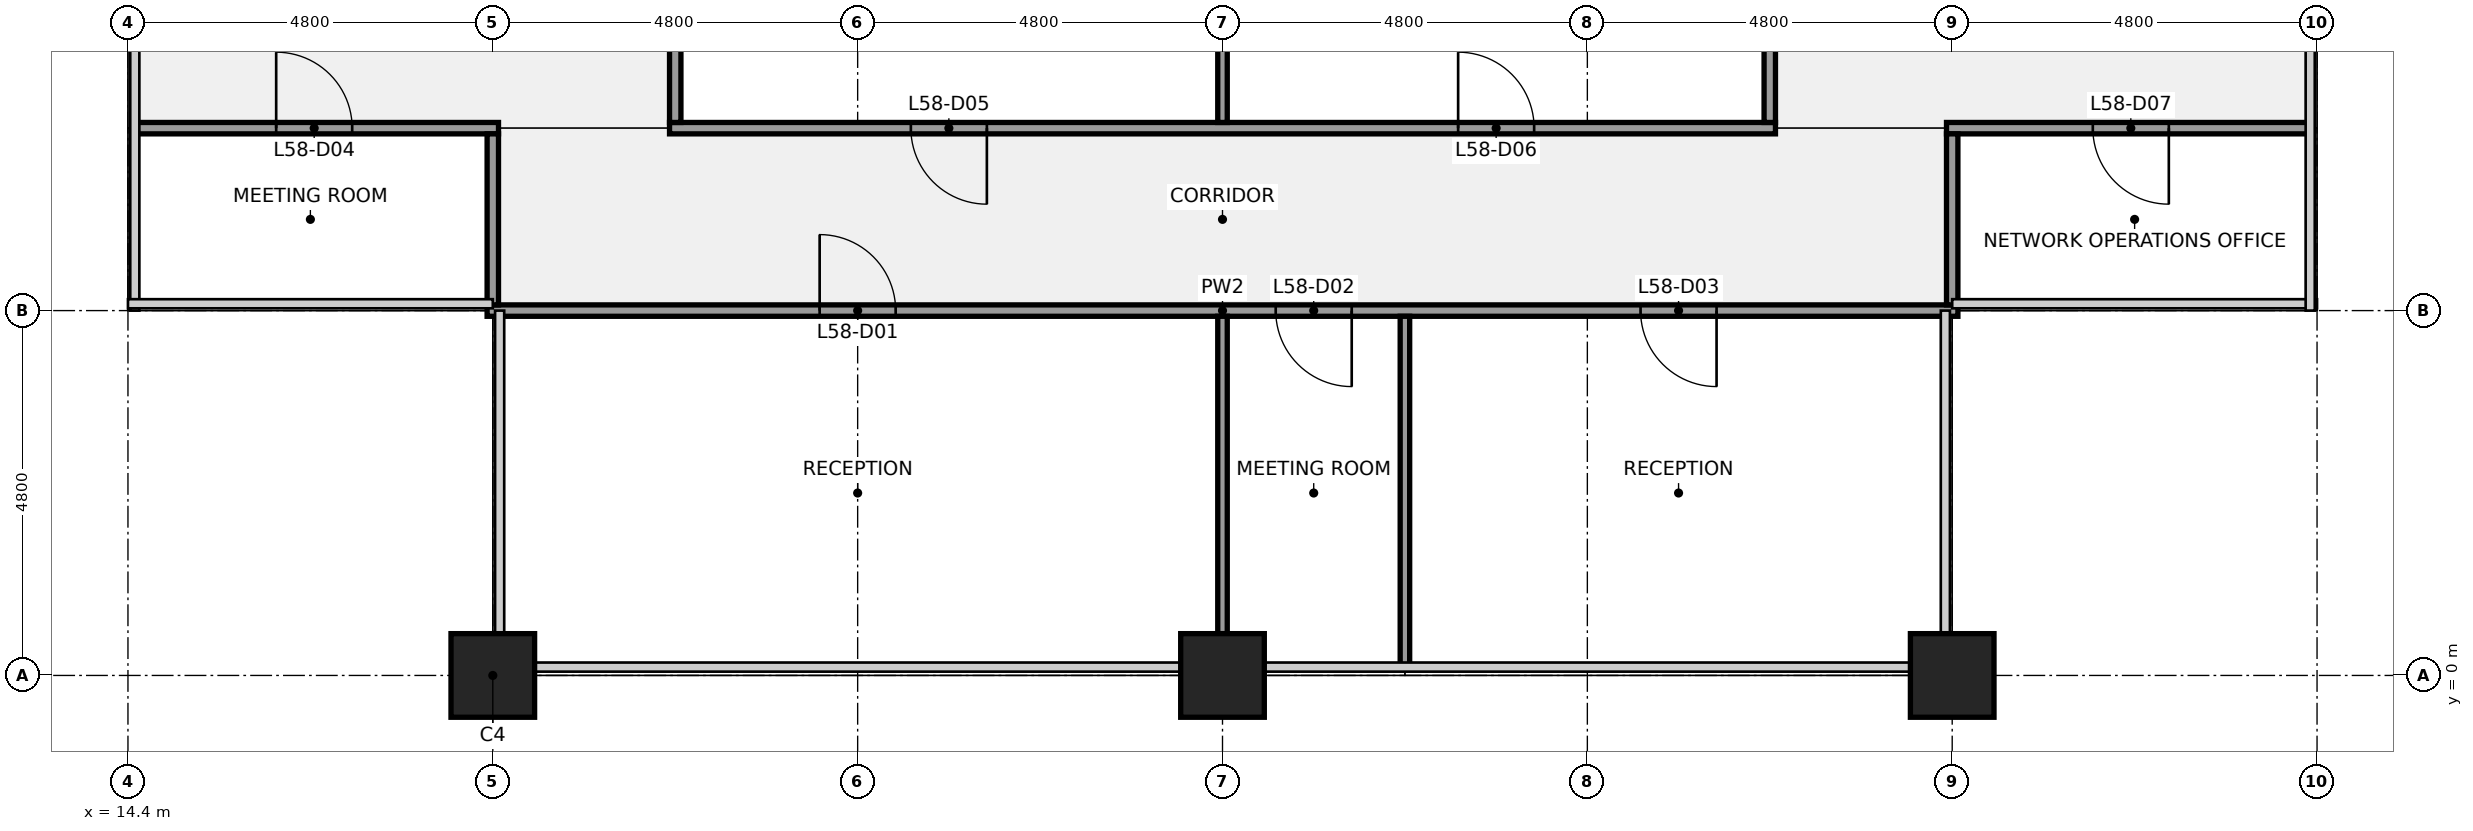
"""IFC4 building model, lengths in metres.
Left out: names, types, materials, properties, quantities, classifications, styles, units other than length and angle.
Written with IfcOpenShell. Run it as: python <this file> out.ifc"""

import sys

from ifc_helpers import new_model, si_unit, direction, frame, frame_2d, origin, origin_2d, place, context, subcontext, project, spatial, rectangle, extrude, element, fill, save


model = new_model("IFC4")
c1 = context("Model", 3, precision=1e-05, world=origin(), true_north=direction((0.0, 1.0)))
c2 = subcontext(c1, "Body", "Model", "MODEL_VIEW")
j1 = project(units=[si_unit("LENGTHUNIT", "METRE"), si_unit("PLANEANGLEUNIT", "RADIAN")], contexts=[c1])
p1 = place(None, origin())
s1 = spatial("IfcSite", under=j1, at=p1, CompositionType="ELEMENT")
p2 = place(p1, origin())
s2 = spatial("IfcBuilding", under=s1, at=p2, CompositionType="ELEMENT")
p3 = place(p2, frame((0.0, 0.0, 261.2)))
s3 = spatial("IfcBuildingStorey", under=s2, at=p3, CompositionType="ELEMENT", Elevation=261.2)
for number, where, z_axis, x_axis in (
    (1, (19.2, 0.0, 0.0), (0.0, 0.0, 1.0), (1.0, 0.0, 0.0)),
    (2, (28.8, 0.0, 0.0), (0.0, 0.0, 1.0), (1.0, 0.0, 0.0)),
    (3, (38.4, 0.0, 0.0), (0.0, 0.0, 1.0), (1.0, 0.0, 0.0)),
):
    element("IfcColumn", number, at=place(p3, frame(where, z_axis=z_axis, x_axis=x_axis)), inside=s3, PredefinedType="COLUMN", context=c2, shape_type="SweptSolid", body=[
        extrude(rectangle(XDim=1.1, YDim=1.1, at=origin_2d()), origin(), (0.0, 0.0, 1.0), 4.0),
    ])
p4 = place(p3, frame((19.125, 4.8, 0.0), z_axis=(0.0, 0.0, 1.0), x_axis=(1.0, 0.0, 0.0)))
e4 = element("IfcWall", 4, at=p4, inside=s3, PredefinedType="PARTITIONING", context=c2, shape_type="SweptSolid", body=[
    extrude(rectangle(XDim=19.35, YDim=0.15, at=frame_2d((9.675, 0.0))), origin(), (0.0, 0.0, 1.0), 2.709),
])
p5 = place(p4, frame((4.375, 0.0, 0.0)))
e5 = element("IfcOpeningElement", 5, at=p5, cuts=e4, PredefinedType="OPENING", context=c2, shape_type="SweptSolid", body=[
    extrude(rectangle(XDim=1.0, YDim=2.1, at=frame_2d((0.5, 1.05))), frame((0.0, 0.085, 0.0), z_axis=(0.0, -1.0, 0.0), x_axis=(1.0, 0.0, 0.0)), (0.0, 0.0, 1.0), 0.17),
])
p6 = place(p4, frame((10.375, 0.0, 0.0)))
e6 = element("IfcOpeningElement", 6, at=p6, cuts=e4, PredefinedType="OPENING", context=c2, shape_type="SweptSolid", body=[
    extrude(rectangle(XDim=1.0, YDim=2.1, at=frame_2d((0.5, 1.05))), frame((0.0, 0.085, 0.0), z_axis=(0.0, -1.0, 0.0), x_axis=(1.0, 0.0, 0.0)), (0.0, 0.0, 1.0), 0.17),
])
p7 = place(p4, frame((15.175, 0.0, 0.0)))
e7 = element("IfcOpeningElement", 7, at=p7, cuts=e4, PredefinedType="OPENING", context=c2, shape_type="SweptSolid", body=[
    extrude(rectangle(XDim=1.0, YDim=2.1, at=frame_2d((0.5, 1.05))), frame((0.0, 0.085, 0.0), z_axis=(0.0, -1.0, 0.0), x_axis=(1.0, 0.0, 0.0)), (0.0, 0.0, 1.0), 0.17),
])
p8 = place(p3, frame((14.5, 7.2, 0.0), z_axis=(0.0, 0.0, 1.0), x_axis=(1.0, 0.0, 0.0)))
e8 = element("IfcWall", 8, at=p8, inside=s3, PredefinedType="PARTITIONING", context=c2, shape_type="SweptSolid", body=[
    extrude(rectangle(XDim=4.775, YDim=0.15, at=frame_2d((2.387, 0.0))), origin(), (0.0, 0.0, 1.0), 2.709),
])
p9 = place(p8, frame((1.85, 0.0, 0.0)))
e9 = element("IfcOpeningElement", 9, at=p9, cuts=e8, PredefinedType="OPENING", context=c2, shape_type="SweptSolid", body=[
    extrude(rectangle(XDim=1.0, YDim=2.1, at=frame_2d((0.5, 1.05))), frame((0.0, 0.085, 0.0), z_axis=(0.0, -1.0, 0.0), x_axis=(1.0, 0.0, 0.0)), (0.0, 0.0, 1.0), 0.17),
])
p10 = place(p3, frame((21.525, 7.2, 0.0), z_axis=(0.0, 0.0, 1.0), x_axis=(1.0, 0.0, 0.0)))
e10 = element("IfcWall", 10, at=p10, inside=s3, PredefinedType="PARTITIONING", context=c2, shape_type="SweptSolid", body=[
    extrude(rectangle(XDim=14.55, YDim=0.15, at=frame_2d((7.275, 0.0))), origin(), (0.0, 0.0, 1.0), 2.709),
])
p11 = place(p10, frame((3.175, 0.0, 0.0)))
e11 = element("IfcOpeningElement", 11, at=p11, cuts=e10, PredefinedType="OPENING", context=c2, shape_type="SweptSolid", body=[
    extrude(rectangle(XDim=1.0, YDim=2.1, at=frame_2d((0.5, 1.05))), frame((0.0, 0.085, 0.0), z_axis=(0.0, -1.0, 0.0), x_axis=(1.0, 0.0, 0.0)), (0.0, 0.0, 1.0), 0.17),
])
p12 = place(p10, frame((10.375, 0.0, 0.0)))
e12 = element("IfcOpeningElement", 12, at=p12, cuts=e10, PredefinedType="OPENING", context=c2, shape_type="SweptSolid", body=[
    extrude(rectangle(XDim=1.0, YDim=2.1, at=frame_2d((0.5, 1.05))), frame((0.0, 0.085, 0.0), z_axis=(0.0, -1.0, 0.0), x_axis=(1.0, 0.0, 0.0)), (0.0, 0.0, 1.0), 0.17),
])
p13 = place(p3, frame((38.325, 7.2, 0.0), z_axis=(0.0, 0.0, 1.0), x_axis=(1.0, 0.0, 0.0)))
e13 = element("IfcWall", 13, at=p13, inside=s3, PredefinedType="PARTITIONING", context=c2, shape_type="SweptSolid", body=[
    extrude(rectangle(XDim=4.775, YDim=0.15, at=frame_2d((2.388, 0.0))), origin(), (0.0, 0.0, 1.0), 2.709),
])
p14 = place(p13, frame((1.925, 0.0, 0.0)))
e14 = element("IfcOpeningElement", 14, at=p14, cuts=e13, PredefinedType="OPENING", context=c2, shape_type="SweptSolid", body=[
    extrude(rectangle(XDim=1.0, YDim=2.1, at=frame_2d((0.5, 1.05))), frame((0.0, 0.085, 0.0), z_axis=(0.0, -1.0, 0.0), x_axis=(1.0, 0.0, 0.0)), (0.0, 0.0, 1.0), 0.17),
])
p15 = place(p3, frame((19.2, 4.875, 0.0), z_axis=(0.0, 0.0, 1.0), x_axis=(0.0, 1.0, 0.0)))
e15 = element("IfcWall", 15, at=p15, inside=s3, PredefinedType="PARTITIONING", context=c2, shape_type="SweptSolid", body=[
    extrude(rectangle(XDim=2.25, YDim=0.15, at=frame_2d((1.125, 0.0))), origin(), (0.0, 0.0, 1.0), 2.709),
])
p16 = place(p3, frame((21.6, 7.275, 0.0), z_axis=(0.0, 0.0, 1.0), x_axis=(0.0, 1.0, 0.0)))
e16 = element("IfcWall", 16, at=p16, inside=s3, PredefinedType="PARTITIONING", context=c2, shape_type="SweptSolid", body=[
    extrude(rectangle(XDim=4.663, YDim=0.15, at=frame_2d((2.331, 0.0))), origin(), (0.0, 0.0, 1.0), 2.709),
])
p17 = place(p3, frame((28.8, 0.55, 0.0), z_axis=(0.0, 0.0, 1.0), x_axis=(0.0, 1.0, 0.0)))
e17 = element("IfcWall", 17, at=p17, inside=s3, PredefinedType="PARTITIONING", context=c2, shape_type="SweptSolid", body=[
    extrude(rectangle(XDim=4.175, YDim=0.125, at=frame_2d((2.087, 0.0))), origin(), (0.0, 0.0, 1.0), 2.709),
])
p18 = place(p3, frame((28.8, 7.275, 0.0), z_axis=(0.0, 0.0, 1.0), x_axis=(0.0, 1.0, 0.0)))
e18 = element("IfcWall", 18, at=p18, inside=s3, PredefinedType="PARTITIONING", context=c2, shape_type="SweptSolid", body=[
    extrude(rectangle(XDim=4.663, YDim=0.125, at=frame_2d((2.331, 0.0))), origin(), (0.0, 0.0, 1.0), 2.709),
])
p19 = place(p3, frame((31.2, 0.1, 0.0), z_axis=(0.0, 0.0, 1.0), x_axis=(0.0, 1.0, 0.0)))
e19 = element("IfcWall", 19, at=p19, inside=s3, PredefinedType="PARTITIONING", context=c2, shape_type="SweptSolid", body=[
    extrude(rectangle(XDim=4.625, YDim=0.125, at=frame_2d((2.312, 0.0))), origin(), (0.0, 0.0, 1.0), 2.709),
])
p20 = place(p3, frame((36.0, 7.275, 0.0), z_axis=(0.0, 0.0, 1.0), x_axis=(0.0, 1.0, 0.0)))
e20 = element("IfcWall", 20, at=p20, inside=s3, PredefinedType="PARTITIONING", context=c2, shape_type="SweptSolid", body=[
    extrude(rectangle(XDim=4.663, YDim=0.15, at=frame_2d((2.331, 0.0))), origin(), (0.0, 0.0, 1.0), 2.709),
])
p21 = place(p3, frame((38.4, 4.875, 0.0), z_axis=(0.0, 0.0, 1.0), x_axis=(0.0, 1.0, 0.0)))
e21 = element("IfcWall", 21, at=p21, inside=s3, PredefinedType="PARTITIONING", context=c2, shape_type="SweptSolid", body=[
    extrude(rectangle(XDim=2.25, YDim=0.15, at=frame_2d((1.125, 0.0))), origin(), (0.0, 0.0, 1.0), 2.709),
])
for number, where, z_axis, x_axis in (
    (22, (19.2, -1.025, 0.0), (0.0, 0.0, 1.0), (1.0, 0.0, 0.0)),
    (23, (38.4, -1.025, 0.0), (0.0, 0.0, 1.0), (1.0, 0.0, 0.0)),
):
    element("IfcColumn", number, at=place(p3, frame(where, z_axis=z_axis, x_axis=x_axis)), inside=s3, PredefinedType="PILASTER", context=c2, shape_type="SweptSolid", body=[
        extrude(rectangle(XDim=2.4, YDim=0.95, at=origin_2d()), origin(), (0.0, 0.0, 1.0), 4.0),
    ])
p22 = place(p5, origin())
e24 = element("IfcDoor", 24, at=p22, inside=s3, OperationType="SINGLE_SWING_LEFT", PredefinedType="DOOR", context=c2, shape_type="SweptSolid", body=[
    extrude(rectangle(XDim=1.0, YDim=2.1, at=frame_2d((0.5, 1.05))), frame((0.0, 0.025, 0.0), z_axis=(0.0, -1.0, 0.0), x_axis=(1.0, 0.0, 0.0)), (0.0, 0.0, 1.0), 0.05),
])
fill(e5, e24)
p23 = place(p6, origin())
e25 = element("IfcDoor", 25, at=p23, inside=s3, OperationType="SINGLE_SWING_RIGHT", PredefinedType="DOOR", context=c2, shape_type="SweptSolid", body=[
    extrude(rectangle(XDim=1.0, YDim=2.1, at=frame_2d((0.5, 1.05))), frame((0.0, 0.025, 0.0), z_axis=(0.0, -1.0, 0.0), x_axis=(1.0, 0.0, 0.0)), (0.0, 0.0, 1.0), 0.05),
])
fill(e6, e25)
p24 = place(p7, origin())
e26 = element("IfcDoor", 26, at=p24, inside=s3, OperationType="SINGLE_SWING_RIGHT", PredefinedType="DOOR", context=c2, shape_type="SweptSolid", body=[
    extrude(rectangle(XDim=1.0, YDim=2.1, at=frame_2d((0.5, 1.05))), frame((0.0, 0.025, 0.0), z_axis=(0.0, -1.0, 0.0), x_axis=(1.0, 0.0, 0.0)), (0.0, 0.0, 1.0), 0.05),
])
fill(e7, e26)
p25 = place(p9, origin())
e27 = element("IfcDoor", 27, at=p25, inside=s3, OperationType="SINGLE_SWING_LEFT", PredefinedType="DOOR", context=c2, shape_type="SweptSolid", body=[
    extrude(rectangle(XDim=1.0, YDim=2.1, at=frame_2d((0.5, 1.05))), frame((0.0, 0.025, 0.0), z_axis=(0.0, -1.0, 0.0), x_axis=(1.0, 0.0, 0.0)), (0.0, 0.0, 1.0), 0.05),
])
fill(e9, e27)
p26 = place(p11, origin())
e28 = element("IfcDoor", 28, at=p26, inside=s3, OperationType="SINGLE_SWING_RIGHT", PredefinedType="DOOR", context=c2, shape_type="SweptSolid", body=[
    extrude(rectangle(XDim=1.0, YDim=2.1, at=frame_2d((0.5, 1.05))), frame((0.0, 0.025, 0.0), z_axis=(0.0, -1.0, 0.0), x_axis=(1.0, 0.0, 0.0)), (0.0, 0.0, 1.0), 0.05),
])
fill(e11, e28)
p27 = place(p12, origin())
e29 = element("IfcDoor", 29, at=p27, inside=s3, OperationType="SINGLE_SWING_LEFT", PredefinedType="DOOR", context=c2, shape_type="SweptSolid", body=[
    extrude(rectangle(XDim=1.0, YDim=2.1, at=frame_2d((0.5, 1.05))), frame((0.0, 0.025, 0.0), z_axis=(0.0, -1.0, 0.0), x_axis=(1.0, 0.0, 0.0)), (0.0, 0.0, 1.0), 0.05),
])
fill(e12, e29)
p28 = place(p14, origin())
e30 = element("IfcDoor", 30, at=p28, inside=s3, OperationType="SINGLE_SWING_RIGHT", PredefinedType="DOOR", context=c2, shape_type="SweptSolid", body=[
    extrude(rectangle(XDim=1.0, YDim=2.1, at=frame_2d((0.5, 1.05))), frame((0.0, 0.025, 0.0), z_axis=(0.0, -1.0, 0.0), x_axis=(1.0, 0.0, 0.0)), (0.0, 0.0, 1.0), 0.05),
])
fill(e14, e30)
save(model, sys.argv[1])
